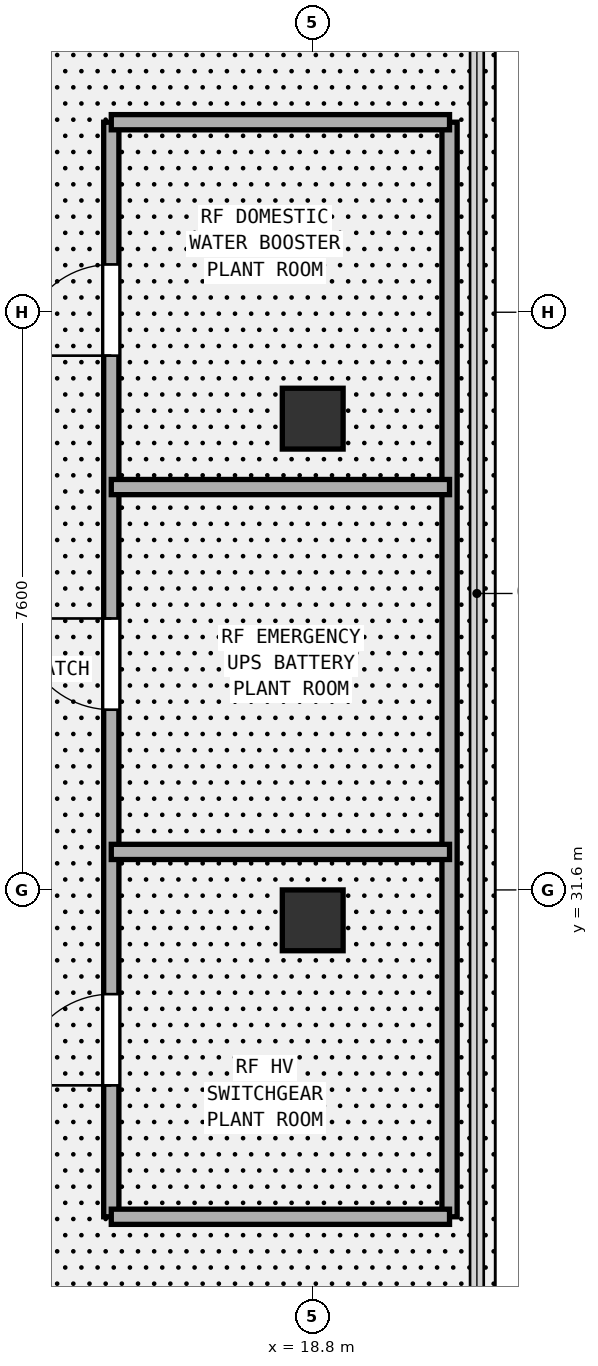
"""IFC4 building model, lengths in metres.
Left out: names, types, materials, properties, quantities, classifications, styles, units other than length and angle.
Written with IfcOpenShell. Run it as: python <this file> out.ifc"""

import sys

from ifc_helpers import new_model, si_unit, direction, frame, frame_2d, origin, origin_2d, place, context, subcontext, project, spatial, rectangle, extrude, element, fill, save


model = new_model("IFC4")
c1 = context("Model", 3, precision=1e-05, world=origin(), true_north=direction((0.0, 1.0)))
c2 = subcontext(c1, "Body", "Model", "MODEL_VIEW")
j1 = project(units=[si_unit("LENGTHUNIT", "METRE"), si_unit("PLANEANGLEUNIT", "RADIAN")], contexts=[c1])
p1 = place(None, origin())
s1 = spatial("IfcSite", under=j1, at=p1, CompositionType="ELEMENT")
p2 = place(p1, origin())
s2 = spatial("IfcBuilding", under=s1, at=p2, CompositionType="ELEMENT")
p3 = place(p2, frame((0.0, 0.0, 360.4)))
s3 = spatial("IfcBuildingStorey", under=s2, at=p3, CompositionType="ELEMENT", Elevation=360.4)
for number, where, z_axis, x_axis in (
    (1, (18.8, 31.2, 0.0), (0.0, 0.0, 1.0), (1.0, 0.0, 0.0)),
    (2, (18.8, 37.8, 0.0), (0.0, 0.0, 1.0), (1.0, 0.0, 0.0)),
):
    element("IfcColumn", number, at=place(p3, frame(where, z_axis=z_axis, x_axis=x_axis)), inside=s3, PredefinedType="COLUMN", context=c2, shape_type="SweptSolid", body=[
        extrude(rectangle(XDim=0.8, YDim=0.8, at=origin_2d()), origin(), (0.0, 0.0, 1.0), 4.749),
    ])
p4 = place(p3, frame((16.15, 27.3, 0.0), z_axis=(0.0, 0.0, 1.0), x_axis=(0.0, 1.0, 0.0)))
e3 = element("IfcWall", 3, at=p4, inside=s3, PredefinedType="PARTITIONING", context=c2, shape_type="SweptSolid", body=[
    extrude(rectangle(XDim=14.4, YDim=0.2, at=frame_2d((7.2, 0.0))), origin(), (0.0, 0.0, 1.0), 4.48),
])
p5 = place(p4, frame((1.729, 0.0, 0.0)))
e4 = element("IfcOpeningElement", 4, at=p5, cuts=e3, PredefinedType="OPENING", context=c2, shape_type="SweptSolid", body=[
    extrude(rectangle(XDim=1.2, YDim=2.25, at=frame_2d((0.6, 1.125))), frame((0.0, 0.11, 0.0), z_axis=(0.0, -1.0, 0.0), x_axis=(1.0, 0.0, 0.0)), (0.0, 0.0, 1.0), 0.22),
])
p6 = place(p4, frame((6.671, 0.0, 0.0)))
e5 = element("IfcOpeningElement", 5, at=p6, cuts=e3, PredefinedType="OPENING", context=c2, shape_type="SweptSolid", body=[
    extrude(rectangle(XDim=1.2, YDim=2.25, at=frame_2d((0.6, 1.125))), frame((0.0, 0.11, 0.0), z_axis=(0.0, -1.0, 0.0), x_axis=(1.0, 0.0, 0.0)), (0.0, 0.0, 1.0), 0.22),
])
p7 = place(p4, frame((11.329, 0.0, 0.0)))
e6 = element("IfcOpeningElement", 6, at=p7, cuts=e3, PredefinedType="OPENING", context=c2, shape_type="SweptSolid", body=[
    extrude(rectangle(XDim=1.2, YDim=2.25, at=frame_2d((0.6, 1.125))), frame((0.0, 0.11, 0.0), z_axis=(0.0, -1.0, 0.0), x_axis=(1.0, 0.0, 0.0)), (0.0, 0.0, 1.0), 0.22),
])
p8 = place(p3, frame((20.6, 27.3, 0.0), z_axis=(0.0, 0.0, 1.0), x_axis=(0.0, 1.0, 0.0)))
e7 = element("IfcWall", 7, at=p8, inside=s3, PredefinedType="PARTITIONING", context=c2, shape_type="SweptSolid", body=[
    extrude(rectangle(XDim=14.4, YDim=0.2, at=frame_2d((7.2, 0.0))), origin(), (0.0, 0.0, 1.0), 4.48),
])
for number, where, z_axis, x_axis in (
    (8, (16.15, 27.3, 0.0), (0.0, 0.0, 1.0), (1.0, 0.0, 0.0)),
    (9, (16.15, 41.7, 0.0), (0.0, 0.0, 1.0), (1.0, 0.0, 0.0)),
    (10, (16.15, 32.1, 0.0), (0.0, 0.0, 1.0), (1.0, 0.0, 0.0)),
    (11, (16.15, 36.9, 0.0), (0.0, 0.0, 1.0), (1.0, 0.0, 0.0)),
):
    element("IfcWall", number, at=place(p3, frame(where, z_axis=z_axis, x_axis=x_axis)), inside=s3, PredefinedType="PARTITIONING", context=c2, shape_type="SweptSolid", body=[
        extrude(rectangle(XDim=4.45, YDim=0.2, at=frame_2d((2.225, 0.0))), origin(), (0.0, 0.0, 1.0), 4.48),
    ])
p9 = place(p5, origin())
e12 = element("IfcDoor", 12, at=p9, inside=s3, OperationType="SINGLE_SWING_LEFT", PredefinedType="DOOR", context=c2, shape_type="SweptSolid", body=[
    extrude(rectangle(XDim=1.2, YDim=2.25, at=frame_2d((0.6, 1.125))), frame((0.0, 0.025, 0.0), z_axis=(0.0, -1.0, 0.0), x_axis=(1.0, 0.0, 0.0)), (0.0, 0.0, 1.0), 0.05),
])
fill(e4, e12)
p10 = place(p6, origin())
e13 = element("IfcDoor", 13, at=p10, inside=s3, OperationType="SINGLE_SWING_RIGHT", PredefinedType="DOOR", context=c2, shape_type="SweptSolid", body=[
    extrude(rectangle(XDim=1.2, YDim=2.25, at=frame_2d((0.6, 1.125))), frame((0.0, 0.025, 0.0), z_axis=(0.0, -1.0, 0.0), x_axis=(1.0, 0.0, 0.0)), (0.0, 0.0, 1.0), 0.05),
])
fill(e5, e13)
p11 = place(p7, origin())
e14 = element("IfcDoor", 14, at=p11, inside=s3, OperationType="SINGLE_SWING_LEFT", PredefinedType="DOOR", context=c2, shape_type="SweptSolid", body=[
    extrude(rectangle(XDim=1.2, YDim=2.25, at=frame_2d((0.6, 1.125))), frame((0.0, 0.025, 0.0), z_axis=(0.0, -1.0, 0.0), x_axis=(1.0, 0.0, 0.0)), (0.0, 0.0, 1.0), 0.05),
])
fill(e6, e14)
save(model, sys.argv[1])
